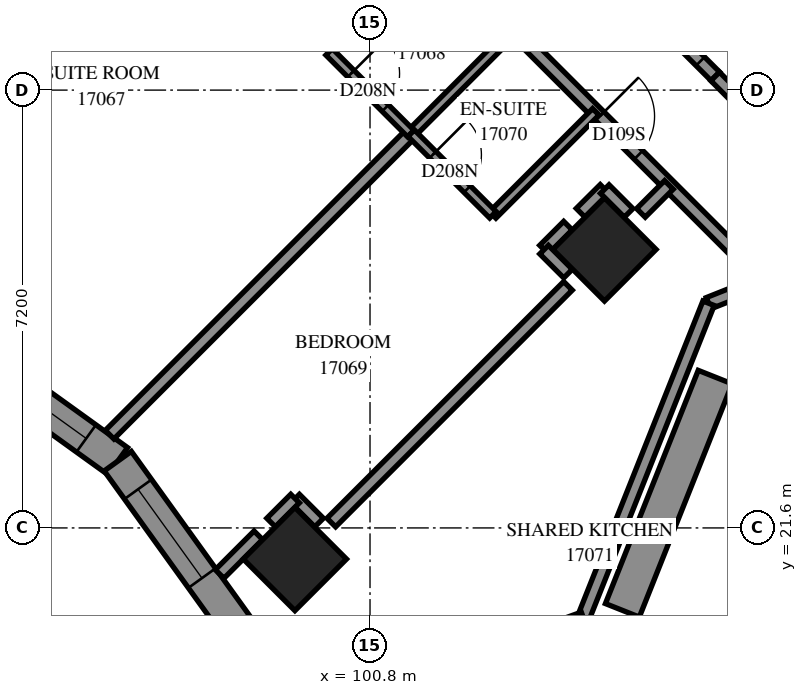
"""IFC4 building model, lengths in metres.
Left out: names, types, materials, properties, quantities, classifications, styles, units other than length and angle.
Written with IfcOpenShell. Run it as: python <this file> out.ifc"""

import sys

from ifc_helpers import new_model, si_unit, direction, frame, frame_2d, origin, origin_2d, place, context, subcontext, project, spatial, polyline, rectangle, outline, extrude, element, fill, save


model = new_model("IFC4")
c1 = context("Model", 3, precision=1e-05, world=origin(), true_north=direction((0.0, 1.0)))
c2 = subcontext(c1, "Body", "Model", "MODEL_VIEW")
j1 = project(units=[si_unit("LENGTHUNIT", "METRE"), si_unit("PLANEANGLEUNIT", "RADIAN")], contexts=[c1])
p1 = place(None, origin())
s1 = spatial("IfcSite", under=j1, at=p1, CompositionType="ELEMENT")
p2 = place(p1, origin())
s2 = spatial("IfcBuilding", under=s1, at=p2, CompositionType="ELEMENT")
p3 = place(p2, frame((0.0, 0.0, 64.4)))
s3 = spatial("IfcBuildingStorey", under=s2, at=p3, CompositionType="ELEMENT", Elevation=64.4)
for number, where, z_axis, x_axis in (
    (1, (104.656, 26.18, 0.0), (0.0, 0.0, 1.0), (0.707, -0.707, 0.0)),
    (2, (99.565, 21.088, 0.0), (0.0, 0.0, 1.0), (0.707, -0.707, 0.0)),
):
    element("IfcColumn", number, at=place(p3, frame(where, z_axis=z_axis, x_axis=x_axis)), inside=s3, PredefinedType="COLUMN", context=c2, shape_type="SweptSolid", body=[
        extrude(rectangle(XDim=1.2, YDim=1.2, at=origin_2d()), origin(), (0.0, 0.0, 1.0), 3.1),
    ])
p4 = place(p3, frame((93.473, 24.986, 0.0), z_axis=(0.0, 0.0, 1.0), x_axis=(0.8116253681, -0.5841782792, 0.0)))
e3 = element("IfcWall", 3, at=p4, inside=s3, PredefinedType="SOLIDWALL", context=c2, shape_type="SweptSolid", body=[
    extrude(outline(polyline([(-0.045, -0.275), (3.872, -0.275), (3.962, 0.275), (0.045, 0.275), (-0.045, -0.275)])), origin(), (0.0, 0.0, 1.0), 3.1),
])
p5 = place(p4, frame((0.477, 0.0, 0.5)))
e4 = element("IfcOpeningElement", 4, at=p5, cuts=e3, PredefinedType="OPENING", context=c2, shape_type="SweptSolid", body=[
    extrude(rectangle(XDim=2.8, YDim=2.45, at=frame_2d((1.4, 1.225))), frame((0.0, 0.285, 0.0), z_axis=(0.0, -1.0, 0.0), x_axis=(1.0, 0.0, 0.0)), (0.0, 0.0, 1.0), 0.57),
])
p6 = place(p3, frame((96.652, 22.698, 0.0), z_axis=(0.0, 0.0, 1.0), x_axis=(0.5841782792, -0.8116253681, 0.0)))
e5 = element("IfcWall", 5, at=p6, inside=s3, PredefinedType="SOLIDWALL", context=c2, shape_type="SweptSolid", body=[
    extrude(outline(polyline([(0.045, -0.275), (3.962, -0.275), (3.872, 0.275), (-0.045, 0.275), (0.045, -0.275)])), origin(), (0.0, 0.0, 1.0), 3.1),
])
p7 = place(p6, frame((0.57, 0.0, 0.7)))
e6 = element("IfcOpeningElement", 6, at=p7, cuts=e5, PredefinedType="OPENING", context=c2, shape_type="SweptSolid", body=[
    extrude(rectangle(XDim=1.8, YDim=2.0, at=frame_2d((0.9, 1.0))), frame((0.0, 0.285, 0.0), z_axis=(0.0, -1.0, 0.0), x_axis=(1.0, 0.0, 0.0)), (0.0, 0.0, 1.0), 0.57),
])
p8 = place(p3, frame((111.542, 27.354, 0.0), z_axis=(0.0, 0.0, 1.0), x_axis=(-0.9291537819, -0.3696934536, 0.0)))
e7 = element("IfcWall", 7, at=p8, inside=s3, PredefinedType="PARAPET", context=c2, shape_type="SweptSolid", body=[
    extrude(outline(polyline([(0.045, -0.1), (5.612, -0.1), (5.526, 0.1), (-0.045, 0.1), (0.045, -0.1)])), origin(), (0.0, 0.0, 1.0), 0.25),
])
p9 = place(p3, frame((106.367, 25.295, 0.0), z_axis=(0.0, 0.0, 1.0), x_axis=(-0.3696779509, -0.92915995, 0.0)))
e8 = element("IfcWall", 8, at=p9, inside=s3, PredefinedType="PARAPET", context=c2, shape_type="SweptSolid", body=[
    extrude(outline(polyline([(-0.043, -0.1), (5.524, -0.1), (5.614, 0.1), (0.043, 0.1), (-0.043, -0.1)])), origin(), (0.0, 0.0, 1.0), 0.25),
])
p10 = place(p3, frame((104.309, 20.121, 0.0), z_axis=(0.0, 0.0, 1.0), x_axis=(-0.9407017457, -0.3392347648, 0.0)))
e9 = element("IfcWall", 9, at=p10, inside=s3, PredefinedType="PARAPET", context=c2, shape_type="SweptSolid", body=[
    extrude(outline(polyline([(0.045, -0.1), (4.061, -0.1), (4.061, 0.1), (-0.045, 0.1), (0.045, -0.1)])), origin(), (0.0, 0.0, 1.0), 0.25),
])
p11 = place(p3, frame((106.476, 24.081, 0.0), z_axis=(0.0, 0.0, 1.0), x_axis=(-0.369669248, -0.9291634125, 0.0)))
e10 = element("IfcWall", 10, at=p11, inside=s3, PredefinedType="SOLIDWALL", context=c2, shape_type="SweptSolid", body=[
    extrude(rectangle(XDim=4.128, YDim=0.6, at=frame_2d((2.064, 0.0))), origin(), (0.0, 0.0, 1.0), 0.65),
])
p12 = place(p3, frame((101.825, 31.125, 0.0), z_axis=(0.0, 0.0, 1.0), x_axis=(0.7071067812, -0.7071067812, 0.0)))
e11 = element("IfcWall", 11, at=p12, inside=s3, PredefinedType="PARTITIONING", context=c2, shape_type="SweptSolid", body=[
    extrude(rectangle(XDim=12.7, YDim=0.2, at=frame_2d((6.35, 0.0))), origin(), (0.0, 0.0, 1.0), 3.1),
])
p13 = place(p12, frame((3.895, 0.0, 0.0)))
e12 = element("IfcOpeningElement", 12, at=p13, cuts=e11, PredefinedType="OPENING", context=c2, shape_type="SweptSolid", body=[
    extrude(rectangle(XDim=0.9, YDim=2.1, at=frame_2d((0.45, 1.05))), frame((0.0, 0.11, 0.0), z_axis=(0.0, -1.0, 0.0), x_axis=(1.0, 0.0, 0.0)), (0.0, 0.0, 1.0), 0.22),
])
p14 = place(p12, frame((9.056, 0.0, 0.0)))
e13 = element("IfcOpeningElement", 13, at=p14, cuts=e11, PredefinedType="OPENING", context=c2, shape_type="SweptSolid", body=[
    extrude(rectangle(XDim=1.0, YDim=2.1, at=frame_2d((0.5, 1.05))), frame((0.0, 0.11, 0.0), z_axis=(0.0, -1.0, 0.0), x_axis=(1.0, 0.0, 0.0)), (0.0, 0.0, 1.0), 0.22),
])
p15 = place(p3, frame((96.517, 23.134, 0.0), z_axis=(0.0, 0.0, 1.0), x_axis=(0.7071139158, 0.7070996465, 0.0)))
e14 = element("IfcWall", 14, at=p15, inside=s3, PredefinedType="PARTITIONING", context=c2, shape_type="SweptSolid", body=[
    extrude(rectangle(XDim=7.008, YDim=0.2, at=frame_2d((3.504, 0.0))), origin(), (0.0, 0.0, 1.0), 3.1),
])
p16 = place(p3, frame((91.458, 28.256, 0.0), z_axis=(0.0, 0.0, 1.0), x_axis=(0.7071067812, 0.7071067812, 0.0)))
e15 = element("IfcWall", 15, at=p16, inside=s3, PredefinedType="PARTITIONING", context=c2, shape_type="SweptSolid", body=[
    extrude(rectangle(XDim=6.963, YDim=0.2, at=frame_2d((3.482, 0.0))), origin(), (0.0, 0.0, 1.0), 3.1),
])
p17 = place(p3, frame((100.163, 21.689, 0.0), z_axis=(0.0, 0.0, 1.0), x_axis=(0.7071067812, 0.7071067812, 0.0)))
e16 = element("IfcWall", 16, at=p17, inside=s3, PredefinedType="PARTITIONING", context=c2, shape_type="SweptSolid", body=[
    extrude(rectangle(XDim=5.504, YDim=0.2, at=frame_2d((2.752, 0.0))), origin(), (0.0, 0.0, 1.0), 2.6),
])
p18 = place(p3, frame((105.257, 16.597, 0.0), z_axis=(0.0, 0.0, 1.0), x_axis=(0.7072884866, 0.706925029, 0.0)))
e17 = element("IfcWall", 17, at=p18, inside=s3, PredefinedType="PARTITIONING", context=c2, shape_type="SweptSolid", body=[
    extrude(rectangle(XDim=5.503, YDim=0.2, at=frame_2d((2.751, 0.0))), origin(), (0.0, 0.0, 1.0), 3.1),
])
p19 = place(p3, frame((104.445, 31.059, 0.0), z_axis=(0.0, 0.0, 1.0), x_axis=(0.7074545101, -0.7067588812, 0.0)))
e18 = element("IfcWall", 18, at=p19, inside=s3, PredefinedType="PARTITIONING", context=c2, shape_type="SweptSolid", body=[
    extrude(rectangle(XDim=2.875, YDim=0.2, at=frame_2d((1.438, 0.0))), origin(), (0.0, 0.0, 1.0), 3.1),
])
p20 = place(p19, frame((1.626, 0.0, 0.0)))
e19 = element("IfcOpeningElement", 19, at=p20, cuts=e18, PredefinedType="OPENING", context=c2, shape_type="SweptSolid", body=[
    extrude(rectangle(XDim=0.9, YDim=2.1, at=frame_2d((0.45, 1.05))), frame((0.0, 0.11, 0.0), z_axis=(0.0, -1.0, 0.0), x_axis=(1.0, 0.0, 0.0)), (0.0, 0.0, 1.0), 0.22),
])
p21 = place(p3, frame((100.129, 29.433, 0.0), z_axis=(0.0, 0.0, 1.0), x_axis=(0.7071067812, 0.7071067812, 0.0)))
e20 = element("IfcWall", 20, at=p21, inside=s3, PredefinedType="PARTITIONING", context=c2, shape_type="SweptSolid", body=[
    extrude(rectangle(XDim=2.401, YDim=0.15, at=frame_2d((1.201, 0.0))), origin(), (0.0, 0.0, 1.0), 3.1),
])
p22 = place(p3, frame((101.477, 28.085, 0.0), z_axis=(0.0, 0.0, 1.0), x_axis=(0.706689978, 0.7075233388, 0.0)))
e21 = element("IfcWall", 21, at=p22, inside=s3, PredefinedType="PARTITIONING", context=c2, shape_type="SweptSolid", body=[
    extrude(rectangle(XDim=2.4, YDim=0.15, at=frame_2d((1.2, 0.0))), origin(), (0.0, 0.0, 1.0), 3.1),
])
p23 = place(p3, frame((102.817, 26.747, 0.0), z_axis=(0.0, 0.0, 1.0), x_axis=(0.7071067812, 0.7071067812, 0.0)))
e22 = element("IfcWall", 22, at=p23, inside=s3, PredefinedType="PARTITIONING", context=c2, shape_type="SweptSolid", body=[
    extrude(rectangle(XDim=2.398, YDim=0.15, at=frame_2d((1.199, 0.0))), origin(), (0.0, 0.0, 1.0), 3.1),
])
p24 = place(p3, frame((100.127, 29.429, 0.0), z_axis=(0.0, 0.0, 1.0), x_axis=(0.7071067812, -0.7071067812, 0.0)))
e23 = element("IfcWall", 23, at=p24, inside=s3, PredefinedType="PARTITIONING", context=c2, shape_type="SweptSolid", body=[
    extrude(rectangle(XDim=1.901, YDim=0.15, at=frame_2d((0.95, 0.0))), origin(), (0.0, 0.0, 1.0), 3.1),
])
p25 = place(p24, frame((0.508, 0.0, 0.0)))
e24 = element("IfcOpeningElement", 24, at=p25, cuts=e23, PredefinedType="OPENING", context=c2, shape_type="SweptSolid", body=[
    extrude(rectangle(XDim=0.8, YDim=2.1, at=frame_2d((0.4, 1.05))), frame((0.0, 0.085, 0.0), z_axis=(0.0, -1.0, 0.0), x_axis=(1.0, 0.0, 0.0)), (0.0, 0.0, 1.0), 0.17),
])
p26 = place(p3, frame((101.477, 28.091, 0.0), z_axis=(0.0, 0.0, 1.0), x_axis=(0.7076330979, -0.7065800724, 0.0)))
e25 = element("IfcWall", 25, at=p26, inside=s3, PredefinedType="PARTITIONING", context=c2, shape_type="SweptSolid", body=[
    extrude(rectangle(XDim=1.899, YDim=0.15, at=frame_2d((0.95, 0.0))), origin(), (0.0, 0.0, 1.0), 3.1),
])
p27 = place(p26, frame((0.501, 0.0, 0.0)))
e26 = element("IfcOpeningElement", 26, at=p27, cuts=e25, PredefinedType="OPENING", context=c2, shape_type="SweptSolid", body=[
    extrude(rectangle(XDim=0.8, YDim=2.1, at=frame_2d((0.4, 1.05))), frame((0.0, 0.085, 0.0), z_axis=(0.0, -1.0, 0.0), x_axis=(1.0, 0.0, 0.0)), (0.0, 0.0, 1.0), 0.17),
])
p28 = place(p3, frame((98.327, 20.842, 0.0), z_axis=(0.0, 0.0, 1.0), x_axis=(0.7071067812, 0.7071067812, 0.0)))
e27 = element("IfcWall", 27, at=p28, inside=s3, PredefinedType="PARTITIONING", context=c2, shape_type="SweptSolid", body=[
    extrude(rectangle(XDim=0.9, YDim=0.2, at=frame_2d((0.45, 0.0))), origin(), (0.0, 0.0, 1.0), 3.1),
])
p29 = place(p3, frame((106.476, 29.024, 0.0), z_axis=(0.0, 0.0, 1.0), x_axis=(0.7057270646, -0.7084838109, 0.0)))
e28 = element("IfcWall", 28, at=p29, inside=s3, PredefinedType="PARTITIONING", context=c2, shape_type="SweptSolid", body=[
    extrude(rectangle(XDim=0.726, YDim=0.2, at=frame_2d((0.363, 0.0))), origin(), (0.0, 0.0, 1.0), 3.1),
])
p30 = place(p3, frame((105.255, 26.781, 0.0), z_axis=(0.0, 0.0, 1.0), x_axis=(0.7071067812, 0.7071067812, 0.0)))
e29 = element("IfcWall", 29, at=p30, inside=s3, PredefinedType="PARTITIONING", context=c2, shape_type="SweptSolid", body=[
    extrude(rectangle(XDim=0.65, YDim=0.2, at=frame_2d((0.325, 0.0))), origin(), (0.0, 0.0, 1.0), 2.6),
])
for number, where, z_axis, x_axis in (
    (30, (99.568, 22.082, 0.0), (0.0, 0.0, 1.0), (0.707, -0.707, 0.0)),
    (31, (99.173, 21.689, 0.0), (0.0, 0.0, 1.0), (0.707, 0.707, 0.0)),
    (32, (103.661, 26.177, 0.0), (0.0, 0.0, 1.0), (0.707, 0.707, 0.0)),
    (33, (103.662, 26.177, 0.0), (0.0, 0.0, 1.0), (0.707, -0.707, 0.0)),
):
    element("IfcWall", number, at=place(p3, frame(where, z_axis=z_axis, x_axis=x_axis)), inside=s3, PredefinedType="PARTITIONING", context=c2, shape_type="SweptSolid", body=[
        extrude(rectangle(XDim=0.557, YDim=0.2, at=frame_2d((0.279, 0.0))), origin(), (0.0, 0.0, 1.0), 3.1),
    ])
p31 = place(p3, frame((104.263, 26.784, 0.0), z_axis=(0.0, 0.0, 1.0), x_axis=(0.7089037401, 0.705305244, 0.0)))
e34 = element("IfcWall", 34, at=p31, inside=s3, PredefinedType="PARTITIONING", context=c2, shape_type="SweptSolid", body=[
    extrude(rectangle(XDim=0.556, YDim=0.2, at=frame_2d((0.278, 0.0))), origin(), (0.0, 0.0, 1.0), 3.1),
])
p32 = place(p3, frame((104.66, 27.172, 0.0), z_axis=(0.0, 0.0, 1.0), x_axis=(0.7071067812, -0.7071067812, 0.0)))
e35 = element("IfcWall", 35, at=p32, inside=s3, PredefinedType="PARTITIONING", context=c2, shape_type="SweptSolid", body=[
    extrude(rectangle(XDim=0.554, YDim=0.2, at=frame_2d((0.277, 0.0))), origin(), (0.0, 0.0, 1.0), 3.1),
])
p33 = place(p5, origin())
e36 = element("IfcWindow", 36, at=p33, inside=s3, PartitioningType="SINGLE_PANEL", PredefinedType="WINDOW", context=c2, shape_type="SweptSolid", body=[
    extrude(rectangle(XDim=2.8, YDim=2.45, at=frame_2d((1.4, 1.225))), frame((0.0, 0.155, 0.0), z_axis=(0.0, -1.0, 0.0), x_axis=(1.0, 0.0, 0.0)), (0.0, 0.0, 1.0), 0.06),
])
fill(e4, e36)
p34 = place(p7, origin())
e37 = element("IfcWindow", 37, at=p34, inside=s3, PartitioningType="SINGLE_PANEL", PredefinedType="WINDOW", context=c2, shape_type="SweptSolid", body=[
    extrude(rectangle(XDim=1.8, YDim=2.0, at=frame_2d((0.9, 1.0))), frame((0.0, 0.155, 0.0), z_axis=(0.0, -1.0, 0.0), x_axis=(1.0, 0.0, 0.0)), (0.0, 0.0, 1.0), 0.06),
])
fill(e6, e37)
p35 = place(p20, origin())
e38 = element("IfcDoor", 38, at=p35, inside=s3, OperationType="SINGLE_SWING_RIGHT", PredefinedType="DOOR", context=c2, shape_type="SweptSolid", body=[
    extrude(rectangle(XDim=0.9, YDim=2.1, at=frame_2d((0.45, 1.05))), frame((0.0, 0.025, 0.0), z_axis=(0.0, -1.0, 0.0), x_axis=(1.0, 0.0, 0.0)), (0.0, 0.0, 1.0), 0.05),
])
fill(e19, e38)
p36 = place(p25, origin())
e39 = element("IfcDoor", 39, at=p36, inside=s3, OperationType="SINGLE_SWING_RIGHT", PredefinedType="DOOR", context=c2, shape_type="SweptSolid", body=[
    extrude(rectangle(XDim=0.8, YDim=2.1, at=frame_2d((0.4, 1.05))), frame((0.0, 0.025, 0.0), z_axis=(0.0, -1.0, 0.0), x_axis=(1.0, 0.0, 0.0)), (0.0, 0.0, 1.0), 0.05),
])
fill(e24, e39)
p37 = place(p13, origin())
e40 = element("IfcDoor", 40, at=p37, inside=s3, OperationType="SINGLE_SWING_LEFT", PredefinedType="DOOR", context=c2, shape_type="SweptSolid", body=[
    extrude(rectangle(XDim=0.9, YDim=2.1, at=frame_2d((0.45, 1.05))), frame((0.0, 0.025, 0.0), z_axis=(0.0, -1.0, 0.0), x_axis=(1.0, 0.0, 0.0)), (0.0, 0.0, 1.0), 0.05),
])
fill(e12, e40)
p38 = place(p27, origin())
e41 = element("IfcDoor", 41, at=p38, inside=s3, OperationType="SINGLE_SWING_RIGHT", PredefinedType="DOOR", context=c2, shape_type="SweptSolid", body=[
    extrude(rectangle(XDim=0.8, YDim=2.1, at=frame_2d((0.4, 1.05))), frame((0.0, 0.025, 0.0), z_axis=(0.0, -1.0, 0.0), x_axis=(1.0, 0.0, 0.0)), (0.0, 0.0, 1.0), 0.05),
])
fill(e26, e41)
save(model, sys.argv[1])
